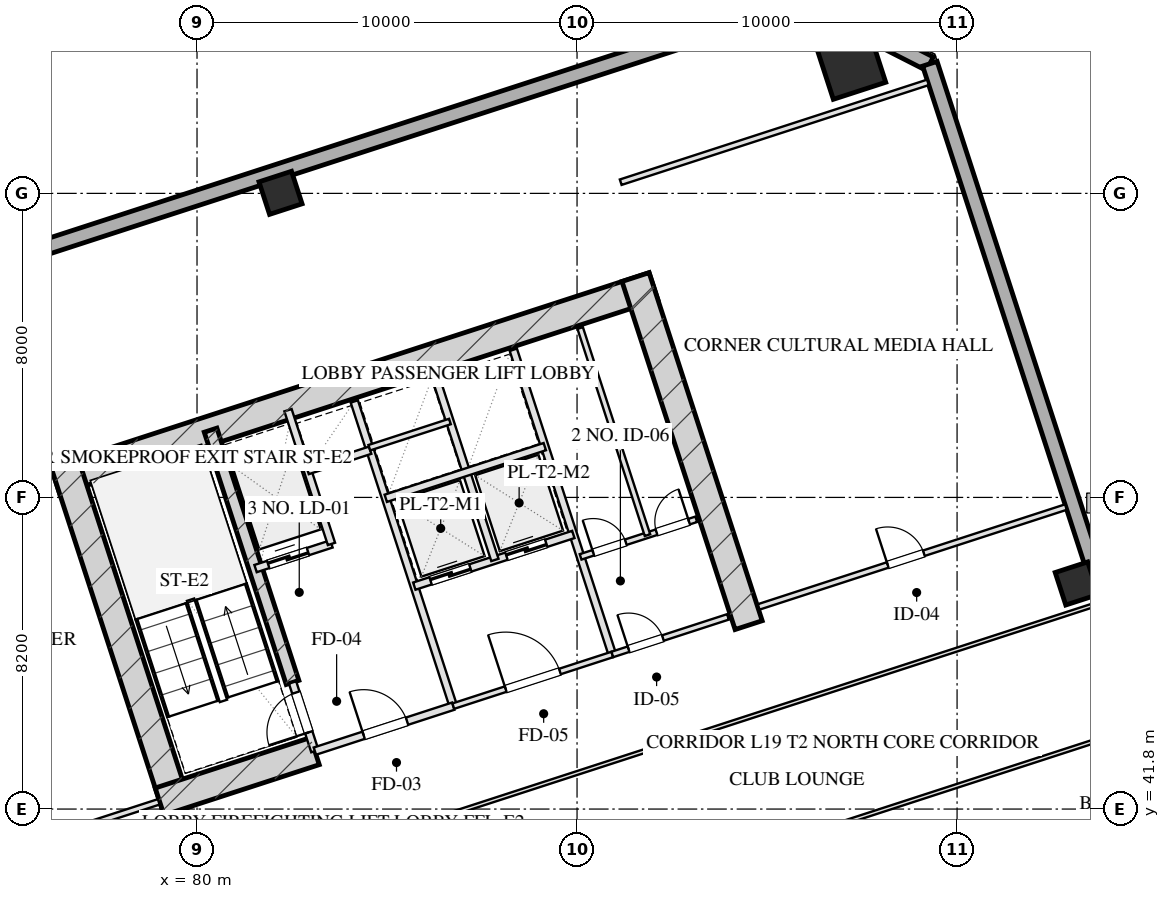
"""IFC4 building model, lengths in metres.
Left out: names, types, materials, properties, quantities, classifications, styles, units other than length and angle.
Written with IfcOpenShell. Run it as: python <this file> out.ifc"""

import sys

from ifc_helpers import new_model, si_unit, direction, frame, frame_2d, origin, origin_2d, place, context, subcontext, project, spatial, rectangle, hollow_rectangle, extrude, element, fill, save


model = new_model("IFC4")
c1 = context("Model", 3, precision=1e-05, world=origin(), true_north=direction((0.0, 1.0)))
c2 = subcontext(c1, "Body", "Model", "MODEL_VIEW")
j1 = project(units=[si_unit("LENGTHUNIT", "METRE"), si_unit("PLANEANGLEUNIT", "RADIAN")], contexts=[c1])
p1 = place(None, origin())
s1 = spatial("IfcSite", under=j1, at=p1, CompositionType="ELEMENT")
p2 = place(p1, origin())
s2 = spatial("IfcBuilding", under=s1, at=p2, CompositionType="ELEMENT")
p3 = place(p2, frame((0.0, 0.0, 78.2)))
s3 = spatial("IfcBuildingStorey", under=s2, at=p3, CompositionType="ELEMENT", Elevation=78.2)
p4 = place(p3, frame((76.272, 50.443, 0.0), z_axis=(0.0, 0.0, 1.0), x_axis=(0.951056072937, 0.309018358888, 0.0)))
e1 = element("IfcWall", 1, at=p4, inside=s3, PredefinedType="SHEAR", context=c2, shape_type="SweptSolid", body=[
    extrude(rectangle(XDim=16.55, YDim=0.75, at=frame_2d((8.275, 0.0))), origin(), (0.0, 0.0, 1.0), 3.45),
])
for number, where, z_axis, x_axis in (
    (2, (79.489, 41.756, 0.0), (0.0, 0.0, 1.0), (-0.309, 0.951, 0.0)),
    (3, (94.515, 46.639, 0.0), (0.0, 0.0, 1.0), (-0.309, 0.951, 0.0)),
):
    element("IfcWall", number, at=place(p3, frame(where, z_axis=z_axis, x_axis=x_axis)), inside=s3, PredefinedType="SHEAR", context=c2, shape_type="SweptSolid", body=[
        extrude(rectangle(XDim=9.63, YDim=0.75, at=frame_2d((4.815, 0.0))), origin(), (0.0, 0.0, 1.0), 3.45),
    ])
p5 = place(p3, frame((82.514, 45.131, 0.0), z_axis=(0.0, 0.0, 1.0), x_axis=(-0.308988790936, 0.951065679686, 0.0)))
e4 = element("IfcWall", 4, at=p5, inside=s3, PredefinedType="SHEAR", context=c2, shape_type="SweptSolid", body=[
    extrude(rectangle(XDim=6.98, YDim=0.35, at=frame_2d((3.49, 0.0))), origin(), (0.0, 0.0, 1.0), 3.45),
])
p6 = place(p3, frame((79.016, 41.997, 0.0), z_axis=(0.0, 0.0, 1.0), x_axis=(0.95106038264, 0.309005094736, 0.0)))
e5 = element("IfcWall", 5, at=p6, inside=s3, PredefinedType="SHEAR", context=c2, shape_type="SweptSolid", body=[
    extrude(rectangle(XDim=4.295, YDim=0.75, at=frame_2d((2.147, 0.0))), origin(), (0.0, 0.0, 1.0), 3.45),
])
p7 = place(p3, frame((97.209, 61.388, 0.0), z_axis=(0.0, 0.0, 1.0), x_axis=(0.951056516295, 0.309016994375, 0.0)))
e6 = element("IfcColumn", 6, at=p7, inside=s3, PredefinedType="COLUMN", context=c2, shape_type="SweptSolid", body=[
    extrude(hollow_rectangle(XDim=1.45, YDim=1.45, WallThickness=0.05, at=origin_2d()), origin(), (0.0, 0.0, 1.0), 3.451),
])
for number, where, z_axis, x_axis in (
    (7, (103.149, 47.736, 0.0), (0.0, 0.0, 1.0), (0.951, 0.309, 0.0)),
    (8, (82.197, 58.014, 0.0), (0.0, 0.0, 1.0), (0.951, 0.309, 0.0)),
):
    element("IfcColumn", number, at=place(p3, frame(where, z_axis=z_axis, x_axis=x_axis)), inside=s3, PredefinedType="COLUMN", context=c2, shape_type="SweptSolid", body=[
        extrude(hollow_rectangle(XDim=0.9, YDim=0.9, WallThickness=0.032, at=origin_2d()), origin(), (0.0, 0.0, 1.0), 3.451),
    ])
p8 = place(p3, frame((80.716, 6.59, 0.0), z_axis=(0.0, 0.0, 1.0), x_axis=(-0.309017542002, 0.95105633836, 0.0)))
e9 = element("IfcWall", 9, at=p8, inside=s3, PredefinedType="SOLIDWALL", context=c2, shape_type="SweptSolid", body=[
    extrude(rectangle(XDim=46.4, YDim=0.4, at=frame_2d((23.2, 0.0))), origin(), (0.0, 0.0, 1.0), 2.61),
])
p9 = place(p8, frame((15.6, 0.0, 0.75)))
e10 = element("IfcOpeningElement", 10, at=p9, cuts=e9, PredefinedType="OPENING", context=c2, shape_type="SweptSolid", body=[
    extrude(rectangle(XDim=2.4, YDim=1.46, at=frame_2d((1.2, 0.73))), frame((0.0, 0.21, 0.0), z_axis=(0.0, -1.0, 0.0), x_axis=(1.0, 0.0, 0.0)), (0.0, 0.0, 1.0), 0.42),
])
p10 = place(p8, frame((19.4, 0.0, 0.75)))
e11 = element("IfcOpeningElement", 11, at=p10, cuts=e9, PredefinedType="OPENING", context=c2, shape_type="SweptSolid", body=[
    extrude(rectangle(XDim=2.4, YDim=1.46, at=frame_2d((1.2, 0.73))), frame((0.0, 0.21, 0.0), z_axis=(0.0, -1.0, 0.0), x_axis=(1.0, 0.0, 0.0)), (0.0, 0.0, 1.0), 0.42),
])
p11 = place(p8, frame((27.05, 0.0, 0.0)))
e12 = element("IfcOpeningElement", 12, at=p11, cuts=e9, PredefinedType="OPENING", context=c2, shape_type="SweptSolid", body=[
    extrude(rectangle(XDim=1.1, YDim=2.15, at=frame_2d((0.55, 1.075))), frame((0.0, 0.21, 0.0), z_axis=(0.0, -1.0, 0.0), x_axis=(1.0, 0.0, 0.0)), (0.0, 0.0, 1.0), 0.42),
])
p12 = place(p3, frame((68.047, 53.995, 0.0), z_axis=(0.0, 0.0, 1.0), x_axis=(0.95105505922, 0.309021478754, 0.0)))
e13 = element("IfcWall", 13, at=p12, inside=s3, PredefinedType="SOLIDWALL", context=c2, shape_type="SweptSolid", body=[
    extrude(rectangle(XDim=29.4, YDim=0.4, at=frame_2d((14.7, 0.0))), origin(), (0.0, 0.0, 1.0), 2.61),
])
p13 = place(p3, frame((96.008, 63.08, 0.0), z_axis=(0.0, 0.0, 1.0), x_axis=(0.891001999643, -0.45399937955, 0.0)))
e14 = element("IfcWall", 14, at=p13, inside=s3, PredefinedType="SOLIDWALL", context=c2, shape_type="SweptSolid", body=[
    extrude(rectangle(XDim=3.677, YDim=0.4, at=frame_2d((1.839, 0.0))), origin(), (0.0, 0.0, 1.0), 2.61),
])
p14 = place(p3, frame((99.284, 61.41, 0.0), z_axis=(0.0, 0.0, 1.0), x_axis=(0.309017542002, -0.95105633836, 0.0)))
e15 = element("IfcWall", 15, at=p14, inside=s3, PredefinedType="SOLIDWALL", context=c2, shape_type="SweptSolid", body=[
    extrude(rectangle(XDim=46.4, YDim=0.4, at=frame_2d((23.2, 0.0))), origin(), (0.0, 0.0, 1.0), 2.61),
])
p15 = place(p14, frame((19.596, 0.0, 0.0)))
e16 = element("IfcOpeningElement", 16, at=p15, cuts=e15, PredefinedType="OPENING", context=c2, shape_type="SweptSolid", body=[
    extrude(rectangle(XDim=1.1, YDim=2.15, at=frame_2d((0.55, 1.075))), frame((0.0, 0.21, 0.0), z_axis=(0.0, -1.0, 0.0), x_axis=(1.0, 0.0, 0.0)), (0.0, 0.0, 1.0), 0.42),
])
p16 = place(p3, frame((83.101, 43.324, 0.0), z_axis=(0.0, 0.0, 1.0), x_axis=(-0.309048298632, 0.951046344356, 0.0)))
e17 = element("IfcWall", 17, at=p16, inside=s3, PredefinedType="PARTITIONING", context=c2, shape_type="SweptSolid", body=[
    extrude(rectangle(XDim=1.9, YDim=0.2, at=frame_2d((0.95, 0.0))), origin(), (0.0, 0.0, 1.0), 3.175),
])
p17 = place(p16, frame((0.52, 0.0, 0.0)))
e18 = element("IfcOpeningElement", 18, at=p17, cuts=e17, PredefinedType="OPENING", context=c2, shape_type="SweptSolid", body=[
    extrude(rectangle(XDim=1.1, YDim=2.05, at=frame_2d((0.55, 1.025))), frame((0.0, 0.11, 0.0), z_axis=(0.0, -1.0, 0.0), x_axis=(1.0, 0.0, 0.0)), (0.0, 0.0, 1.0), 0.22),
])
p18 = place(p3, frame((86.743, 44.508, 0.0), z_axis=(0.0, 0.0, 1.0), x_axis=(-0.309016001439, 0.951056838919, 0.0)))
e19 = element("IfcWall", 19, at=p18, inside=s3, PredefinedType="PARTITIONING", context=c2, shape_type="SweptSolid", body=[
    extrude(rectangle(XDim=8.43, YDim=0.2, at=frame_2d((4.215, 0.0))), origin(), (0.0, 0.0, 1.0), 3.175),
])
p19 = place(p3, frame((83.101, 43.324, 0.0), z_axis=(0.0, 0.0, 1.0), x_axis=(0.951052804469, 0.309028417967, 0.0)))
e20 = element("IfcWall", 20, at=p19, inside=s3, PredefinedType="PARTITIONING", context=c2, shape_type="SweptSolid", body=[
    extrude(rectangle(XDim=3.83, YDim=0.2, at=frame_2d((1.915, 0.0))), origin(), (0.0, 0.0, 1.0), 3.175),
])
p20 = place(p19, frame((1.35, 0.0, 0.0)))
e21 = element("IfcOpeningElement", 21, at=p20, cuts=e20, PredefinedType="OPENING", context=c2, shape_type="SweptSolid", body=[
    extrude(rectangle(XDim=1.2, YDim=2.05, at=frame_2d((0.6, 1.025))), frame((0.0, 0.11, 0.0), z_axis=(0.0, -1.0, 0.0), x_axis=(1.0, 0.0, 0.0)), (0.0, 0.0, 1.0), 0.22),
])
p21 = place(p3, frame((81.54, 48.127, 0.0), z_axis=(0.0, 0.0, 1.0), x_axis=(0.951062257173, 0.308999325213, 0.0)))
e22 = element("IfcWall", 22, at=p21, inside=s3, PredefinedType="PARTITIONING", context=c2, shape_type="SweptSolid", body=[
    extrude(rectangle(XDim=2.1, YDim=0.2, at=frame_2d((1.05, 0.0))), origin(), (0.0, 0.0, 1.0), 3.175),
])
p22 = place(p21, frame((0.35, 0.0, 0.0)))
e23 = element("IfcOpeningElement", 23, at=p22, cuts=e22, PredefinedType="OPENING", context=c2, shape_type="SweptSolid", body=[
    extrude(rectangle(XDim=1.1, YDim=2.05, at=frame_2d((0.55, 1.025))), frame((0.0, 0.11, 0.0), z_axis=(0.0, -1.0, 0.0), x_axis=(1.0, 0.0, 0.0)), (0.0, 0.0, 1.0), 0.22),
])
p23 = place(p3, frame((83.538, 48.776, 0.0), z_axis=(0.0, 0.0, 1.0), x_axis=(-0.3089935693, 0.951064127245, 0.0)))
e24 = element("IfcWall", 24, at=p23, inside=s3, PredefinedType="PARTITIONING", context=c2, shape_type="SweptSolid", body=[
    extrude(rectangle(XDim=3.7, YDim=0.2, at=frame_2d((1.85, 0.0))), origin(), (0.0, 0.0, 1.0), 3.175),
])
p24 = place(p3, frame((82.91, 50.707, 0.0), z_axis=(0.0, 0.0, 1.0), x_axis=(0.951041328149, 0.309063734775, 0.0)))
e25 = element("IfcWall", 25, at=p24, inside=s3, PredefinedType="PARTITIONING", context=c2, shape_type="SweptSolid", body=[
    extrude(rectangle(XDim=1.73, YDim=0.2, at=frame_2d((0.865, 0.0))), origin(), (0.0, 0.0, 1.0), 3.175),
])
p25 = place(p3, frame((90.928, 45.868, 0.0), z_axis=(0.0, 0.0, 1.0), x_axis=(-0.309042196757, 0.951048327176, 0.0)))
e26 = element("IfcWall", 26, at=p25, inside=s3, PredefinedType="PARTITIONING", context=c2, shape_type="SweptSolid", body=[
    extrude(rectangle(XDim=8.43, YDim=0.2, at=frame_2d((4.215, 0.0))), origin(), (0.0, 0.0, 1.0), 3.175),
])
p26 = place(p3, frame((86.743, 44.508, 0.0), z_axis=(0.0, 0.0, 1.0), x_axis=(0.951063829732, 0.308994485023, 0.0)))
e27 = element("IfcWall", 27, at=p26, inside=s3, PredefinedType="PARTITIONING", context=c2, shape_type="SweptSolid", body=[
    extrude(rectangle(XDim=4.4, YDim=0.15, at=frame_2d((2.2, 0.0))), origin(), (0.0, 0.0, 1.0), 3.175),
])
p27 = place(p26, frame((1.45, 0.0, 0.0)))
e28 = element("IfcOpeningElement", 28, at=p27, cuts=e27, PredefinedType="OPENING", context=c2, shape_type="SweptSolid", body=[
    extrude(rectangle(XDim=1.5, YDim=2.05, at=frame_2d((0.75, 1.025))), frame((0.0, 0.085, 0.0), z_axis=(0.0, -1.0, 0.0), x_axis=(1.0, 0.0, 0.0)), (0.0, 0.0, 1.0), 0.17),
])
p28 = place(p3, frame((85.718, 47.666, 0.0), z_axis=(0.0, 0.0, 1.0), x_axis=(0.951058531764, 0.30901079133, 0.0)))
e29 = element("IfcWall", 29, at=p28, inside=s3, PredefinedType="PARTITIONING", context=c2, shape_type="SweptSolid", body=[
    extrude(rectangle(XDim=4.4, YDim=0.2, at=frame_2d((2.2, 0.0))), origin(), (0.0, 0.0, 1.0), 3.175),
])
p29 = place(p28, frame((0.45, 0.0, 0.0)))
e30 = element("IfcOpeningElement", 30, at=p29, cuts=e29, PredefinedType="OPENING", context=c2, shape_type="SweptSolid", body=[
    extrude(rectangle(XDim=1.1, YDim=2.05, at=frame_2d((0.55, 1.025))), frame((0.0, 0.11, 0.0), z_axis=(0.0, -1.0, 0.0), x_axis=(1.0, 0.0, 0.0)), (0.0, 0.0, 1.0), 0.22),
])
p30 = place(p28, frame((2.55, 0.0, 0.0)))
e31 = element("IfcOpeningElement", 31, at=p30, cuts=e29, PredefinedType="OPENING", context=c2, shape_type="SweptSolid", body=[
    extrude(rectangle(XDim=1.1, YDim=2.05, at=frame_2d((0.55, 1.025))), frame((0.0, 0.11, 0.0), z_axis=(0.0, -1.0, 0.0), x_axis=(1.0, 0.0, 0.0)), (0.0, 0.0, 1.0), 0.22),
])
p31 = place(p3, frame((87.838, 48.354, 0.0), z_axis=(0.0, 0.0, 1.0), x_axis=(-0.3090093719, 0.951058992953, 0.0)))
e32 = element("IfcWall", 32, at=p31, inside=s3, PredefinedType="PARTITIONING", context=c2, shape_type="SweptSolid", body=[
    extrude(rectangle(XDim=5.11, YDim=0.2, at=frame_2d((2.555, 0.0))), origin(), (0.0, 0.0, 1.0), 3.175),
])
p32 = place(p3, frame((84.967, 49.977, 0.0), z_axis=(0.0, 0.0, 1.0), x_axis=(0.951063829732, 0.308994485023, 0.0)))
e33 = element("IfcWall", 33, at=p32, inside=s3, PredefinedType="PARTITIONING", context=c2, shape_type="SweptSolid", body=[
    extrude(rectangle(XDim=4.4, YDim=0.2, at=frame_2d((2.2, 0.0))), origin(), (0.0, 0.0, 1.0), 3.175),
])
p33 = place(p3, frame((84.534, 51.308, 0.0), z_axis=(0.0, 0.0, 1.0), x_axis=(0.951075093106, 0.308959814982, 0.0)))
e34 = element("IfcWall", 34, at=p33, inside=s3, PredefinedType="PARTITIONING", context=c2, shape_type="SweptSolid", body=[
    extrude(rectangle(XDim=2.23, YDim=0.15, at=frame_2d((1.115, 0.0))), origin(), (0.0, 0.0, 1.0), 3.175),
])
p34 = place(p3, frame((90.928, 45.868, 0.0), z_axis=(0.0, 0.0, 1.0), x_axis=(0.951059297078, 0.309008435874, 0.0)))
e35 = element("IfcWall", 35, at=p34, inside=s3, PredefinedType="PARTITIONING", context=c2, shape_type="SweptSolid", body=[
    extrude(rectangle(XDim=3.2, YDim=0.15, at=frame_2d((1.6, 0.0))), origin(), (0.0, 0.0, 1.0), 3.175),
])
p35 = place(p34, frame((0.45, 0.0, 0.0)))
e36 = element("IfcOpeningElement", 36, at=p35, cuts=e35, PredefinedType="OPENING", context=c2, shape_type="SweptSolid", body=[
    extrude(rectangle(XDim=0.95, YDim=2.05, at=frame_2d((0.475, 1.025))), frame((0.0, 0.085, 0.0), z_axis=(0.0, -1.0, 0.0), x_axis=(1.0, 0.0, 0.0)), (0.0, 0.0, 1.0), 0.17),
])
p36 = place(p3, frame((90.094, 48.436, 0.0), z_axis=(0.0, 0.0, 1.0), x_axis=(0.951066581729, 0.308986014439, 0.0)))
e37 = element("IfcWall", 37, at=p36, inside=s3, PredefinedType="PARTITIONING", context=c2, shape_type="SweptSolid", body=[
    extrude(rectangle(XDim=3.2, YDim=0.15, at=frame_2d((1.6, 0.0))), origin(), (0.0, 0.0, 1.0), 3.175),
])
p37 = place(p36, frame((0.35, 0.0, 0.0)))
e38 = element("IfcOpeningElement", 38, at=p37, cuts=e37, PredefinedType="OPENING", context=c2, shape_type="SweptSolid", body=[
    extrude(rectangle(XDim=0.9, YDim=2.05, at=frame_2d((0.45, 1.025))), frame((0.0, 0.085, 0.0), z_axis=(0.0, -1.0, 0.0), x_axis=(1.0, 0.0, 0.0)), (0.0, 0.0, 1.0), 0.17),
])
p38 = place(p36, frame((2.1, 0.0, 0.0)))
e39 = element("IfcOpeningElement", 39, at=p38, cuts=e37, PredefinedType="OPENING", context=c2, shape_type="SweptSolid", body=[
    extrude(rectangle(XDim=0.9, YDim=2.05, at=frame_2d((0.45, 1.025))), frame((0.0, 0.085, 0.0), z_axis=(0.0, -1.0, 0.0), x_axis=(1.0, 0.0, 0.0)), (0.0, 0.0, 1.0), 0.17),
])
p39 = place(p3, frame((91.853, 49.007, 0.0), z_axis=(0.0, 0.0, 1.0), x_axis=(-0.309022487551, 0.951054731437, 0.0)))
e40 = element("IfcWall", 40, at=p39, inside=s3, PredefinedType="PARTITIONING", context=c2, shape_type="SweptSolid", body=[
    extrude(rectangle(XDim=5.73, YDim=0.15, at=frame_2d((2.865, 0.0))), origin(), (0.0, 0.0, 1.0), 3.175),
])
p40 = place(p3, frame((70.338, 39.177, 0.0), z_axis=(0.0, 0.0, 1.0), x_axis=(0.951059695568, 0.309007209409, 0.0)))
e41 = element("IfcWall", 41, at=p40, inside=s3, PredefinedType="PARTITIONING", context=c2, shape_type="SweptSolid", body=[
    extrude(rectangle(XDim=9.1, YDim=0.15, at=frame_2d((4.55, 0.0))), origin(), (0.0, 0.0, 1.0), 3.175),
])
p41 = place(p40, frame((3.822, 0.0, 0.0)))
e42 = element("IfcOpeningElement", 42, at=p41, cuts=e41, PredefinedType="OPENING", context=c2, shape_type="SweptSolid", body=[
    extrude(rectangle(XDim=0.85, YDim=2.05, at=frame_2d((0.425, 1.025))), frame((0.0, 0.085, 0.0), z_axis=(0.0, -1.0, 0.0), x_axis=(1.0, 0.0, 0.0)), (0.0, 0.0, 1.0), 0.17),
])
p42 = place(p3, frame((91.149, 58.294, 0.0), z_axis=(0.0, 0.0, 1.0), x_axis=(0.951062770994, 0.308997743729, 0.0)))
e43 = element("IfcWall", 43, at=p42, inside=s3, PredefinedType="PARTITIONING", context=c2, shape_type="SweptSolid", body=[
    extrude(rectangle(XDim=8.5, YDim=0.15, at=frame_2d((4.25, 0.0))), origin(), (0.0, 0.0, 1.0), 3.175),
])
p43 = place(p3, frame((94.78, 47.119, 0.0), z_axis=(0.0, 0.0, 1.0), x_axis=(0.951054329824, 0.309023723562, 0.0)))
e44 = element("IfcWall", 44, at=p43, inside=s3, PredefinedType="PARTITIONING", context=c2, shape_type="SweptSolid", body=[
    extrude(rectangle(XDim=8.5, YDim=0.15, at=frame_2d((4.25, 0.0))), origin(), (0.0, 0.0, 1.0), 3.175),
])
p44 = place(p43, frame((3.57, 0.0, 0.0)))
e45 = element("IfcOpeningElement", 45, at=p44, cuts=e44, PredefinedType="OPENING", context=c2, shape_type="SweptSolid", body=[
    extrude(rectangle(XDim=1.0, YDim=2.05, at=frame_2d((0.5, 1.025))), frame((0.0, 0.085, 0.0), z_axis=(0.0, -1.0, 0.0), x_axis=(1.0, 0.0, 0.0)), (0.0, 0.0, 1.0), 0.17),
])
p45 = place(p3, frame((86.692, 41.673, 0.0), z_axis=(0.0, 0.0, 1.0), x_axis=(0.951057050993, 0.309015348739, 0.0)))
e46 = element("IfcWall", 46, at=p45, inside=s3, PredefinedType="MOVABLE", context=c2, shape_type="SweptSolid", body=[
    extrude(rectangle(XDim=17.875, YDim=0.1, at=frame_2d((8.938, 0.0))), origin(), (0.0, 0.0, 1.0), 3.175),
])
p46 = place(p3, frame((91.834, 25.848, 0.0), z_axis=(0.0, 0.0, 1.0), x_axis=(-0.30901773025, 0.951056277195, 0.0)))
e47 = element("IfcWall", 47, at=p46, inside=s3, PredefinedType="MOVABLE", context=c2, shape_type="SweptSolid", body=[
    extrude(rectangle(XDim=16.64, YDim=0.1, at=frame_2d((8.32, 0.0))), origin(), (0.0, 0.0, 1.0), 3.175),
])
p47 = place(p46, frame((1.16, 0.0, 0.0)))
e48 = element("IfcOpeningElement", 48, at=p47, cuts=e47, PredefinedType="OPENING", context=c2, shape_type="SweptSolid", body=[
    extrude(rectangle(XDim=1.0, YDim=2.05, at=frame_2d((0.5, 1.025))), frame((0.0, 0.06, 0.0), z_axis=(0.0, -1.0, 0.0), x_axis=(1.0, 0.0, 0.0)), (0.0, 0.0, 1.0), 0.12),
])
p48 = place(p46, frame((5.48, 0.0, 0.0)))
e49 = element("IfcOpeningElement", 49, at=p48, cuts=e47, PredefinedType="OPENING", context=c2, shape_type="SweptSolid", body=[
    extrude(rectangle(XDim=1.0, YDim=2.05, at=frame_2d((0.5, 1.025))), frame((0.0, 0.06, 0.0), z_axis=(0.0, -1.0, 0.0), x_axis=(1.0, 0.0, 0.0)), (0.0, 0.0, 1.0), 0.12),
])
p49 = place(p46, frame((8.08, 0.0, 0.0)))
e50 = element("IfcOpeningElement", 50, at=p49, cuts=e47, PredefinedType="OPENING", context=c2, shape_type="SweptSolid", body=[
    extrude(rectangle(XDim=1.05, YDim=2.05, at=frame_2d((0.525, 1.025))), frame((0.0, 0.06, 0.0), z_axis=(0.0, -1.0, 0.0), x_axis=(1.0, 0.0, 0.0)), (0.0, 0.0, 1.0), 0.12),
])
p50 = place(p46, frame((10.874, 0.0, 0.0)))
e51 = element("IfcOpeningElement", 51, at=p50, cuts=e47, PredefinedType="OPENING", context=c2, shape_type="SweptSolid", body=[
    extrude(rectangle(XDim=1.0, YDim=2.05, at=frame_2d((0.5, 1.025))), frame((0.0, 0.06, 0.0), z_axis=(0.0, -1.0, 0.0), x_axis=(1.0, 0.0, 0.0)), (0.0, 0.0, 1.0), 0.12),
])
p51 = place(p46, frame((14.174, 0.0, 0.0)))
e52 = element("IfcOpeningElement", 52, at=p51, cuts=e47, PredefinedType="OPENING", context=c2, shape_type="SweptSolid", body=[
    extrude(rectangle(XDim=1.0, YDim=2.05, at=frame_2d((0.5, 1.025))), frame((0.0, 0.06, 0.0), z_axis=(0.0, -1.0, 0.0), x_axis=(1.0, 0.0, 0.0)), (0.0, 0.0, 1.0), 0.12),
])
p52 = place(p3, frame((87.746, 38.429, 0.0), z_axis=(0.0, 0.0, 1.0), x_axis=(0.951057050993, 0.309015348739, 0.0)))
e53 = element("IfcWall", 53, at=p52, inside=s3, PredefinedType="MOVABLE", context=c2, shape_type="SweptSolid", body=[
    extrude(rectangle(XDim=17.875, YDim=0.1, at=frame_2d((8.938, 0.0))), origin(), (0.0, 0.0, 1.0), 3.175),
])
p53 = place(p17, origin())
e54 = element("IfcDoor", 54, at=p53, inside=s3, OperationType="SINGLE_SWING_LEFT", PredefinedType="DOOR", context=c2, shape_type="SweptSolid", body=[
    extrude(rectangle(XDim=1.1, YDim=2.05, at=frame_2d((0.55, 1.025))), frame((0.0, 0.025, 0.0), z_axis=(0.0, -1.0, 0.0), x_axis=(1.0, 0.0, 0.0)), (0.0, 0.0, 1.0), 0.05),
])
fill(e18, e54)
p54 = place(p20, origin())
e55 = element("IfcDoor", 55, at=p54, inside=s3, OperationType="SINGLE_SWING_LEFT", PredefinedType="DOOR", context=c2, shape_type="SweptSolid", body=[
    extrude(rectangle(XDim=1.2, YDim=2.05, at=frame_2d((0.6, 1.025))), frame((0.0, 0.025, 0.0), z_axis=(0.0, -1.0, 0.0), x_axis=(1.0, 0.0, 0.0)), (0.0, 0.0, 1.0), 0.05),
])
fill(e21, e55)
p55 = place(p22, origin())
e56 = element("IfcDoor", 56, at=p55, inside=s3, OperationType="DOUBLE_DOOR_SLIDING", PredefinedType="DOOR", context=c2, shape_type="SweptSolid", body=[
    extrude(rectangle(XDim=1.1, YDim=2.05, at=frame_2d((0.55, 1.025))), frame((0.0, 0.025, 0.0), z_axis=(0.0, -1.0, 0.0), x_axis=(1.0, 0.0, 0.0)), (0.0, 0.0, 1.0), 0.05),
])
fill(e23, e56)
p56 = place(p27, origin())
e57 = element("IfcDoor", 57, at=p56, inside=s3, OperationType="SINGLE_SWING_LEFT", PredefinedType="DOOR", context=c2, shape_type="SweptSolid", body=[
    extrude(rectangle(XDim=1.5, YDim=2.05, at=frame_2d((0.75, 1.025))), frame((0.0, 0.025, 0.0), z_axis=(0.0, -1.0, 0.0), x_axis=(1.0, 0.0, 0.0)), (0.0, 0.0, 1.0), 0.05),
])
fill(e28, e57)
p57 = place(p29, origin())
e58 = element("IfcDoor", 58, at=p57, inside=s3, OperationType="DOUBLE_DOOR_SLIDING", PredefinedType="DOOR", context=c2, shape_type="SweptSolid", body=[
    extrude(rectangle(XDim=1.1, YDim=2.05, at=frame_2d((0.55, 1.025))), frame((0.0, 0.025, 0.0), z_axis=(0.0, -1.0, 0.0), x_axis=(1.0, 0.0, 0.0)), (0.0, 0.0, 1.0), 0.05),
])
fill(e30, e58)
p58 = place(p30, origin())
e59 = element("IfcDoor", 59, at=p58, inside=s3, OperationType="DOUBLE_DOOR_SLIDING", PredefinedType="DOOR", context=c2, shape_type="SweptSolid", body=[
    extrude(rectangle(XDim=1.1, YDim=2.05, at=frame_2d((0.55, 1.025))), frame((0.0, 0.025, 0.0), z_axis=(0.0, -1.0, 0.0), x_axis=(1.0, 0.0, 0.0)), (0.0, 0.0, 1.0), 0.05),
])
fill(e31, e59)
p59 = place(p35, origin())
e60 = element("IfcDoor", 60, at=p59, inside=s3, OperationType="SINGLE_SWING_LEFT", PredefinedType="DOOR", context=c2, shape_type="SweptSolid", body=[
    extrude(rectangle(XDim=0.95, YDim=2.05, at=frame_2d((0.475, 1.025))), frame((0.0, 0.025, 0.0), z_axis=(0.0, -1.0, 0.0), x_axis=(1.0, 0.0, 0.0)), (0.0, 0.0, 1.0), 0.05),
])
fill(e36, e60)
p60 = place(p37, origin())
e61 = element("IfcDoor", 61, at=p60, inside=s3, OperationType="SINGLE_SWING_LEFT", PredefinedType="DOOR", context=c2, shape_type="SweptSolid", body=[
    extrude(rectangle(XDim=0.9, YDim=2.05, at=frame_2d((0.45, 1.025))), frame((0.0, 0.025, 0.0), z_axis=(0.0, -1.0, 0.0), x_axis=(1.0, 0.0, 0.0)), (0.0, 0.0, 1.0), 0.05),
])
fill(e38, e61)
p61 = place(p38, origin())
e62 = element("IfcDoor", 62, at=p61, inside=s3, OperationType="SINGLE_SWING_RIGHT", PredefinedType="DOOR", context=c2, shape_type="SweptSolid", body=[
    extrude(rectangle(XDim=0.9, YDim=2.05, at=frame_2d((0.45, 1.025))), frame((0.0, 0.025, 0.0), z_axis=(0.0, -1.0, 0.0), x_axis=(1.0, 0.0, 0.0)), (0.0, 0.0, 1.0), 0.05),
])
fill(e39, e62)
p62 = place(p44, origin())
e63 = element("IfcDoor", 63, at=p62, inside=s3, OperationType="SINGLE_SWING_LEFT", PredefinedType="DOOR", context=c2, shape_type="SweptSolid", body=[
    extrude(rectangle(XDim=1.0, YDim=2.05, at=frame_2d((0.5, 1.025))), frame((0.0, 0.025, 0.0), z_axis=(0.0, -1.0, 0.0), x_axis=(1.0, 0.0, 0.0)), (0.0, 0.0, 1.0), 0.05),
])
fill(e45, e63)
save(model, sys.argv[1])
